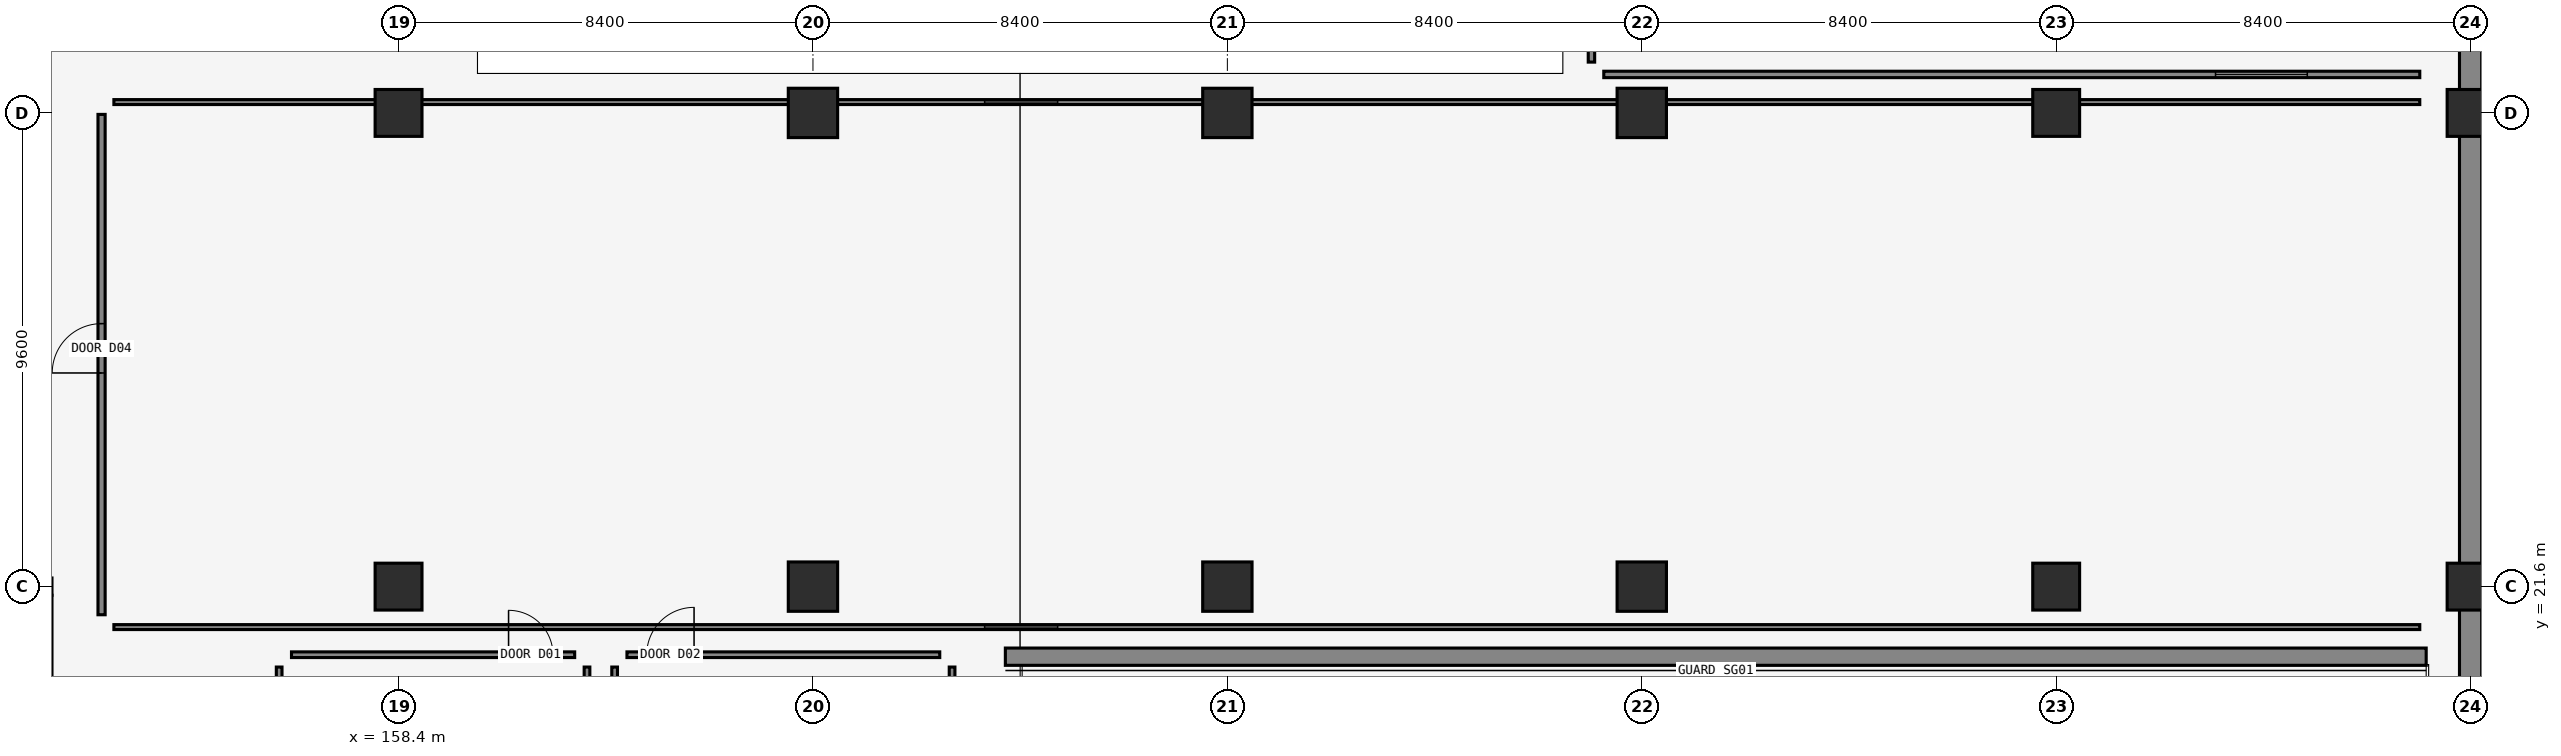
"""IFC4 building model, lengths in metres.
Left out: names, types, materials, properties, quantities, classifications, styles, units other than length and angle.
Written with IfcOpenShell. Run it as: python <this file> out.ifc"""

import sys

from ifc_helpers import new_model, si_unit, direction, frame, frame_2d, origin, origin_2d, place, context, subcontext, project, spatial, rectangle, extrude, element, fill, save


model = new_model("IFC4")
c1 = context("Model", 3, precision=1e-05, world=origin(), true_north=direction((0.0, 1.0)))
c2 = subcontext(c1, "Body", "Model", "MODEL_VIEW")
j1 = project(units=[si_unit("LENGTHUNIT", "METRE"), si_unit("PLANEANGLEUNIT", "RADIAN")], contexts=[c1])
p1 = place(None, origin())
s1 = spatial("IfcSite", under=j1, at=p1, CompositionType="ELEMENT")
p2 = place(p1, origin())
s2 = spatial("IfcBuilding", under=s1, at=p2, CompositionType="ELEMENT")
p3 = place(p2, frame((0.0, 0.0, -4.8)))
s3 = spatial("IfcBuildingStorey", under=s2, at=p3, CompositionType="ELEMENT", Elevation=-4.8)
for number, where, z_axis, x_axis in (
    (1, (158.4, 21.6, 0.0), (0.0, 0.0, 1.0), (1.0, 0.0, 0.0)),
    (2, (158.4, 31.2, 0.0), (0.0, 0.0, 1.0), (1.0, 0.0, 0.0)),
):
    element("IfcColumn", number, at=place(p3, frame(where, z_axis=z_axis, x_axis=x_axis)), inside=s3, PredefinedType="COLUMN", context=c2, shape_type="SweptSolid", body=[
        extrude(rectangle(XDim=0.95, YDim=0.95, at=origin_2d()), origin(), (0.0, 0.0, 1.0), 4.8),
    ])
for number, where, z_axis, x_axis in (
    (3, (166.8, 21.6, 0.0), (0.0, 0.0, 1.0), (1.0, 0.0, 0.0)),
    (4, (166.8, 31.2, 0.0), (0.0, 0.0, 1.0), (1.0, 0.0, 0.0)),
    (5, (175.2, 21.6, 0.0), (0.0, 0.0, 1.0), (1.0, 0.0, 0.0)),
    (6, (175.2, 31.2, 0.0), (0.0, 0.0, 1.0), (1.0, 0.0, 0.0)),
    (7, (183.6, 21.6, 0.0), (0.0, 0.0, 1.0), (1.0, 0.0, 0.0)),
    (8, (183.6, 31.2, 0.0), (0.0, 0.0, 1.0), (1.0, 0.0, 0.0)),
):
    element("IfcColumn", number, at=place(p3, frame(where, z_axis=z_axis, x_axis=x_axis)), inside=s3, PredefinedType="COLUMN", context=c2, shape_type="SweptSolid", body=[
        extrude(rectangle(XDim=1.0, YDim=1.0, at=origin_2d()), origin(), (0.0, 0.0, 1.0), 4.8),
    ])
for number, where, z_axis, x_axis in (
    (9, (192.0, 21.6, 0.0), (0.0, 0.0, 1.0), (1.0, 0.0, 0.0)),
    (10, (192.0, 31.2, 0.0), (0.0, 0.0, 1.0), (1.0, 0.0, 0.0)),
    (11, (200.4, 21.6, 0.0), (0.0, 0.0, 1.0), (1.0, 0.0, 0.0)),
    (12, (200.4, 31.2, 0.0), (0.0, 0.0, 1.0), (1.0, 0.0, 0.0)),
):
    element("IfcColumn", number, at=place(p3, frame(where, z_axis=z_axis, x_axis=x_axis)), inside=s3, PredefinedType="COLUMN", context=c2, shape_type="SweptSolid", body=[
        extrude(rectangle(XDim=0.95, YDim=0.95, at=origin_2d()), origin(), (0.0, 0.0, 1.0), 4.8),
    ])
p4 = place(p3, frame((200.4, 13.65, 0.0), z_axis=(0.0, 0.0, 1.0), x_axis=(0.0, 1.0, 0.0)))
e13 = element("IfcWall", 13, at=p4, inside=s3, PredefinedType="USERDEFINED", context=c2, shape_type="SweptSolid", body=[
    extrude(rectangle(XDim=7.5, YDim=0.45, at=frame_2d((3.75, 0.0))), origin(), (0.0, 0.0, 1.0), 4.8),
])
p5 = place(p3, frame((200.4, 22.05, 0.0), z_axis=(0.0, 0.0, 1.0), x_axis=(0.0, 1.0, 0.0)))
e14 = element("IfcWall", 14, at=p5, inside=s3, PredefinedType="USERDEFINED", context=c2, shape_type="SweptSolid", body=[
    extrude(rectangle(XDim=8.7, YDim=0.45, at=frame_2d((4.35, 0.0))), origin(), (0.0, 0.0, 1.0), 4.8),
])
p6 = place(p3, frame((200.4, 31.65, 0.0), z_axis=(0.0, 0.0, 1.0), x_axis=(0.0, 1.0, 0.0)))
e15 = element("IfcWall", 15, at=p6, inside=s3, PredefinedType="USERDEFINED", context=c2, shape_type="SweptSolid", body=[
    extrude(rectangle(XDim=8.7, YDim=0.45, at=frame_2d((4.35, 0.0))), origin(), (0.0, 0.0, 1.0), 4.8),
])
p7 = place(p3, frame((170.7, 20.18, 0.0), z_axis=(0.0, 0.0, 1.0), x_axis=(1.0, 0.0, 0.0)))
e16 = element("IfcWall", 16, at=p7, inside=s3, PredefinedType="SHEAR", context=c2, shape_type="SweptSolid", body=[
    extrude(rectangle(XDim=28.8, YDim=0.35, at=frame_2d((14.4, 0.0))), origin(), (0.0, 0.0, 1.0), 4.74),
])
p8 = place(p3, frame((152.38, 21.03, 0.0), z_axis=(0.0, 0.0, 1.0), x_axis=(0.0, 1.0, 0.0)))
e17 = element("IfcWall", 17, at=p8, inside=s3, PredefinedType="PARTITIONING", context=c2, shape_type="SweptSolid", body=[
    extrude(rectangle(XDim=10.14, YDim=0.145, at=frame_2d((5.07, 0.0))), origin(), (0.0, 0.0, 1.0), 3.46),
])
p9 = place(p8, frame((4.9, 0.0, 0.0)))
e18 = element("IfcOpeningElement", 18, at=p9, cuts=e17, PredefinedType="OPENING", context=c2, shape_type="SweptSolid", body=[
    extrude(rectangle(XDim=1.0, YDim=2.16, at=frame_2d((0.5, 1.08))), frame((0.0, 0.083, 0.0), z_axis=(0.0, -1.0, 0.0), x_axis=(1.0, 0.0, 0.0)), (0.0, 0.0, 1.0), 0.165),
])
p10 = place(p3, frame((152.63, 20.78, 0.0), z_axis=(0.0, 0.0, 1.0), x_axis=(1.0, 0.0, 0.0)))
e19 = element("IfcWall", 19, at=p10, inside=s3, PredefinedType="PARTITIONING", context=c2, shape_type="SweptSolid", body=[
    extrude(rectangle(XDim=46.74, YDim=0.1, at=frame_2d((23.37, 0.0))), origin(), (0.0, 0.0, 1.0), 2.96),
])
p11 = place(p10, frame((17.65, 0.0, 0.9)))
e20 = element("IfcOpeningElement", 20, at=p11, cuts=e19, PredefinedType="OPENING", context=c2, shape_type="SweptSolid", body=[
    extrude(rectangle(XDim=1.48, YDim=1.35, at=frame_2d((0.74, 0.675))), frame((0.0, 0.06, 0.0), z_axis=(0.0, -1.0, 0.0), x_axis=(1.0, 0.0, 0.0)), (0.0, 0.0, 1.0), 0.12),
])
p12 = place(p3, frame((152.63, 31.42, 0.0), z_axis=(0.0, 0.0, 1.0), x_axis=(1.0, 0.0, 0.0)))
e21 = element("IfcWall", 21, at=p12, inside=s3, PredefinedType="PARTITIONING", context=c2, shape_type="SweptSolid", body=[
    extrude(rectangle(XDim=46.74, YDim=0.1, at=frame_2d((23.37, 0.0))), origin(), (0.0, 0.0, 1.0), 2.96),
])
p13 = place(p12, frame((17.65, 0.0, 0.9)))
e22 = element("IfcOpeningElement", 22, at=p13, cuts=e21, PredefinedType="OPENING", context=c2, shape_type="SweptSolid", body=[
    extrude(rectangle(XDim=1.48, YDim=1.35, at=frame_2d((0.74, 0.675))), frame((0.0, 0.06, 0.0), z_axis=(0.0, -1.0, 0.0), x_axis=(1.0, 0.0, 0.0)), (0.0, 0.0, 1.0), 0.12),
])
p14 = place(p3, frame((182.83, 31.98, 0.0), z_axis=(0.0, 0.0, 1.0), x_axis=(1.0, 0.0, 0.0)))
e23 = element("IfcWall", 23, at=p14, inside=s3, PredefinedType="PARTITIONING", context=c2, shape_type="SweptSolid", body=[
    extrude(rectangle(XDim=16.54, YDim=0.13, at=frame_2d((8.27, 0.0))), origin(), (0.0, 0.0, 1.0), 3.41),
])
p15 = place(p14, frame((12.4, 0.0, 0.9)))
e24 = element("IfcOpeningElement", 24, at=p15, cuts=e23, PredefinedType="OPENING", context=c2, shape_type="SweptSolid", body=[
    extrude(rectangle(XDim=1.86, YDim=1.28, at=frame_2d((0.93, 0.64))), frame((0.0, 0.075, 0.0), z_axis=(0.0, -1.0, 0.0), x_axis=(1.0, 0.0, 0.0)), (0.0, 0.0, 1.0), 0.15),
])
p16 = place(p3, frame((182.58, 32.23, 0.0), z_axis=(0.0, 0.0, 1.0), x_axis=(0.0, 1.0, 0.0)))
e25 = element("IfcWall", 25, at=p16, inside=s3, PredefinedType="PARTITIONING", context=c2, shape_type="SweptSolid", body=[
    extrude(rectangle(XDim=26.14, YDim=0.13, at=frame_2d((13.07, 0.0))), origin(), (0.0, 0.0, 1.0), 2.96),
])
p17 = place(p16, frame((12.4, 0.0, 0.9)))
e26 = element("IfcOpeningElement", 26, at=p17, cuts=e25, PredefinedType="OPENING", context=c2, shape_type="SweptSolid", body=[
    extrude(rectangle(XDim=1.86, YDim=1.28, at=frame_2d((0.93, 0.64))), frame((0.0, 0.075, 0.0), z_axis=(0.0, -1.0, 0.0), x_axis=(1.0, 0.0, 0.0)), (0.0, 0.0, 1.0), 0.15),
])
p18 = place(p3, frame((156.23, 20.22, 0.0), z_axis=(0.0, 0.0, 1.0), x_axis=(1.0, 0.0, 0.0)))
e27 = element("IfcWall", 27, at=p18, inside=s3, PredefinedType="PARTITIONING", context=c2, shape_type="SweptSolid", body=[
    extrude(rectangle(XDim=5.74, YDim=0.115, at=frame_2d((2.87, 0.0))), origin(), (0.0, 0.0, 1.0), 3.615),
])
p19 = place(p18, frame((4.4, 0.0, 0.0)))
e28 = element("IfcOpeningElement", 28, at=p19, cuts=e27, PredefinedType="OPENING", context=c2, shape_type="SweptSolid", body=[
    extrude(rectangle(XDim=0.9, YDim=2.1, at=frame_2d((0.45, 1.05))), frame((0.0, 0.067, 0.0), z_axis=(0.0, -1.0, 0.0), x_axis=(1.0, 0.0, 0.0)), (0.0, 0.0, 1.0), 0.135),
])
p20 = place(p3, frame((155.98, 14.03, 0.0), z_axis=(0.0, 0.0, 1.0), x_axis=(0.0, 1.0, 0.0)))
e29 = element("IfcWall", 29, at=p20, inside=s3, PredefinedType="PARTITIONING", context=c2, shape_type="SweptSolid", body=[
    extrude(rectangle(XDim=5.94, YDim=0.115, at=frame_2d((2.97, 0.0))), origin(), (0.0, 0.0, 1.0), 4.36),
])
p21 = place(p20, frame((2.15, 0.0, 0.9)))
e30 = element("IfcOpeningElement", 30, at=p21, cuts=e29, PredefinedType="OPENING", context=c2, shape_type="SweptSolid", body=[
    extrude(rectangle(XDim=2.68, YDim=1.52, at=frame_2d((1.34, 0.76))), frame((0.0, 0.067, 0.0), z_axis=(0.0, -1.0, 0.0), x_axis=(1.0, 0.0, 0.0)), (0.0, 0.0, 1.0), 0.135),
])
p22 = place(p3, frame((162.22, 14.03, 0.0), z_axis=(0.0, 0.0, 1.0), x_axis=(0.0, 1.0, 0.0)))
e31 = element("IfcWall", 31, at=p22, inside=s3, PredefinedType="PARTITIONING", context=c2, shape_type="SweptSolid", body=[
    extrude(rectangle(XDim=5.94, YDim=0.115, at=frame_2d((2.97, 0.0))), origin(), (0.0, 0.0, 1.0), 4.36),
])
p23 = place(p22, frame((2.15, 0.0, 0.9)))
e32 = element("IfcOpeningElement", 32, at=p23, cuts=e31, PredefinedType="OPENING", context=c2, shape_type="SweptSolid", body=[
    extrude(rectangle(XDim=2.68, YDim=1.52, at=frame_2d((1.34, 0.76))), frame((0.0, 0.067, 0.0), z_axis=(0.0, -1.0, 0.0), x_axis=(1.0, 0.0, 0.0)), (0.0, 0.0, 1.0), 0.135),
])
p24 = place(p3, frame((163.03, 20.22, 0.0), z_axis=(0.0, 0.0, 1.0), x_axis=(1.0, 0.0, 0.0)))
e33 = element("IfcWall", 33, at=p24, inside=s3, PredefinedType="PARTITIONING", context=c2, shape_type="SweptSolid", body=[
    extrude(rectangle(XDim=6.34, YDim=0.115, at=frame_2d((3.17, 0.0))), origin(), (0.0, 0.0, 1.0), 3.46),
])
p25 = place(p24, frame((0.4, 0.0, 0.0)))
e34 = element("IfcOpeningElement", 34, at=p25, cuts=e33, PredefinedType="OPENING", context=c2, shape_type="SweptSolid", body=[
    extrude(rectangle(XDim=0.96, YDim=2.14, at=frame_2d((0.48, 1.07))), frame((0.0, 0.067, 0.0), z_axis=(0.0, -1.0, 0.0), x_axis=(1.0, 0.0, 0.0)), (0.0, 0.0, 1.0), 0.135),
])
p26 = place(p3, frame((162.78, 14.03, 0.0), z_axis=(0.0, 0.0, 1.0), x_axis=(0.0, 1.0, 0.0)))
e35 = element("IfcWall", 35, at=p26, inside=s3, PredefinedType="PARTITIONING", context=c2, shape_type="SweptSolid", body=[
    extrude(rectangle(XDim=5.94, YDim=0.115, at=frame_2d((2.97, 0.0))), origin(), (0.0, 0.0, 1.0), 4.36),
])
p27 = place(p26, frame((2.9, 0.0, 0.9)))
e36 = element("IfcOpeningElement", 36, at=p27, cuts=e35, PredefinedType="OPENING", context=c2, shape_type="SweptSolid", body=[
    extrude(rectangle(XDim=1.16, YDim=1.62, at=frame_2d((0.58, 0.81))), frame((0.0, 0.067, 0.0), z_axis=(0.0, -1.0, 0.0), x_axis=(1.0, 0.0, 0.0)), (0.0, 0.0, 1.0), 0.135),
])
p28 = place(p3, frame((169.62, 14.03, 0.0), z_axis=(0.0, 0.0, 1.0), x_axis=(0.0, 1.0, 0.0)))
e37 = element("IfcWall", 37, at=p28, inside=s3, PredefinedType="PARTITIONING", context=c2, shape_type="SweptSolid", body=[
    extrude(rectangle(XDim=5.94, YDim=0.115, at=frame_2d((2.97, 0.0))), origin(), (0.0, 0.0, 1.0), 4.12),
])
p29 = place(p28, frame((2.9, 0.0, 0.9)))
e38 = element("IfcOpeningElement", 38, at=p29, cuts=e37, PredefinedType="OPENING", context=c2, shape_type="SweptSolid", body=[
    extrude(rectangle(XDim=1.16, YDim=1.62, at=frame_2d((0.58, 0.81))), frame((0.0, 0.067, 0.0), z_axis=(0.0, -1.0, 0.0), x_axis=(1.0, 0.0, 0.0)), (0.0, 0.0, 1.0), 0.135),
])
p30 = place(p9, origin())
e39 = element("IfcDoor", 39, at=p30, inside=s3, OperationType="SINGLE_SWING_LEFT", PredefinedType="DOOR", context=c2, shape_type="SweptSolid", body=[
    extrude(rectangle(XDim=1.0, YDim=2.16, at=frame_2d((0.5, 1.08))), frame((0.0, 0.025, 0.0), z_axis=(0.0, -1.0, 0.0), x_axis=(1.0, 0.0, 0.0)), (0.0, 0.0, 1.0), 0.05),
])
fill(e18, e39)
p31 = place(p11, origin())
e40 = element("IfcWindow", 40, at=p31, inside=s3, PartitioningType="SINGLE_PANEL", PredefinedType="WINDOW", context=c2, shape_type="SweptSolid", body=[
    extrude(rectangle(XDim=1.48, YDim=1.35, at=frame_2d((0.74, 0.675))), frame((0.0, 0.03, 0.0), z_axis=(0.0, -1.0, 0.0), x_axis=(1.0, 0.0, 0.0)), (0.0, 0.0, 1.0), 0.06),
])
fill(e20, e40)
p32 = place(p13, origin())
e41 = element("IfcWindow", 41, at=p32, inside=s3, PartitioningType="SINGLE_PANEL", PredefinedType="WINDOW", context=c2, shape_type="SweptSolid", body=[
    extrude(rectangle(XDim=1.48, YDim=1.35, at=frame_2d((0.74, 0.675))), frame((0.0, 0.03, 0.0), z_axis=(0.0, -1.0, 0.0), x_axis=(1.0, 0.0, 0.0)), (0.0, 0.0, 1.0), 0.06),
])
fill(e22, e41)
p33 = place(p15, origin())
e42 = element("IfcWindow", 42, at=p33, inside=s3, PartitioningType="SINGLE_PANEL", PredefinedType="WINDOW", context=c2, shape_type="SweptSolid", body=[
    extrude(rectangle(XDim=1.86, YDim=1.28, at=frame_2d((0.93, 0.64))), frame((0.0, 0.03, 0.0), z_axis=(0.0, -1.0, 0.0), x_axis=(1.0, 0.0, 0.0)), (0.0, 0.0, 1.0), 0.06),
])
fill(e24, e42)
p34 = place(p19, origin())
e43 = element("IfcDoor", 43, at=p34, inside=s3, OperationType="SINGLE_SWING_LEFT", PredefinedType="DOOR", context=c2, shape_type="SweptSolid", body=[
    extrude(rectangle(XDim=0.9, YDim=2.1, at=frame_2d((0.45, 1.05))), frame((0.0, 0.025, 0.0), z_axis=(0.0, -1.0, 0.0), x_axis=(1.0, 0.0, 0.0)), (0.0, 0.0, 1.0), 0.05),
])
fill(e28, e43)
p35 = place(p25, origin())
e44 = element("IfcDoor", 44, at=p35, inside=s3, OperationType="SINGLE_SWING_RIGHT", PredefinedType="DOOR", context=c2, shape_type="SweptSolid", body=[
    extrude(rectangle(XDim=0.96, YDim=2.14, at=frame_2d((0.48, 1.07))), frame((0.0, 0.025, 0.0), z_axis=(0.0, -1.0, 0.0), x_axis=(1.0, 0.0, 0.0)), (0.0, 0.0, 1.0), 0.05),
])
fill(e34, e44)
save(model, sys.argv[1])
